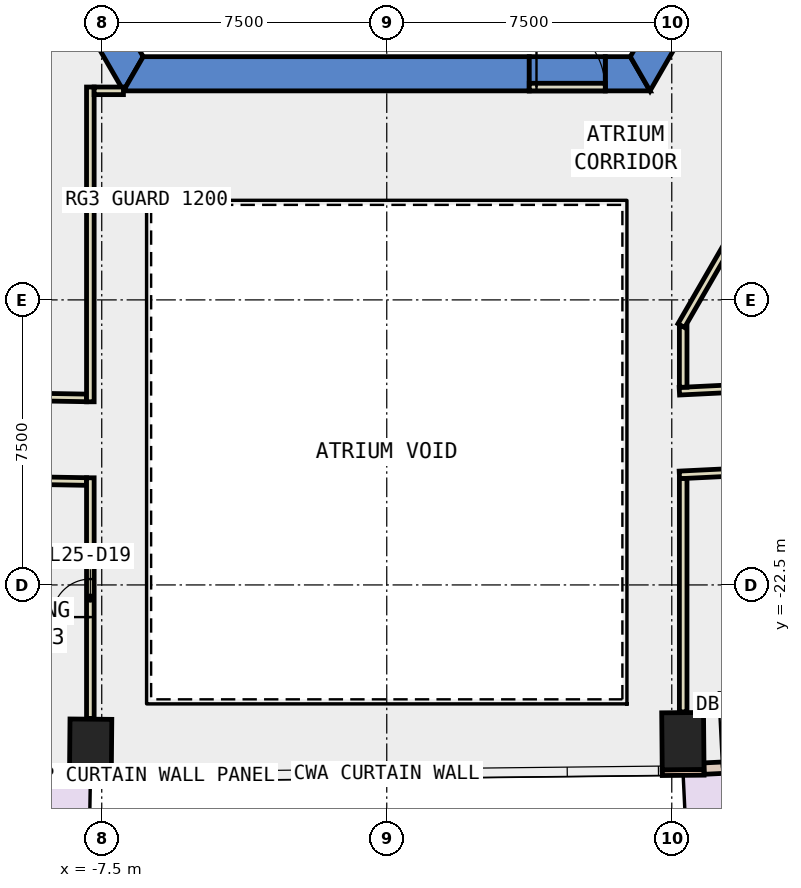
"""IFC4 building model, lengths in metres.
Left out: names, types, materials, properties, quantities, classifications, styles, units other than length and angle.
Written with IfcOpenShell. Run it as: python <this file> out.ifc"""

import sys

from ifc_helpers import new_model, si_unit, direction, frame, frame_2d, origin, origin_2d, place, context, subcontext, project, spatial, polyline, rectangle, outline, extrude, element, fill, save


model = new_model("IFC4")
c1 = context("Model", 3, precision=1e-05, world=origin(), true_north=direction((0.0, 1.0)))
c2 = subcontext(c1, "Body", "Model", "MODEL_VIEW")
j1 = project(units=[si_unit("LENGTHUNIT", "METRE"), si_unit("PLANEANGLEUNIT", "RADIAN")], contexts=[c1])
p1 = place(None, origin())
s1 = spatial("IfcSite", under=j1, at=p1, CompositionType="ELEMENT")
p2 = place(p1, origin())
s2 = spatial("IfcBuilding", under=s1, at=p2, CompositionType="ELEMENT")
p3 = place(p2, frame((0.0, 0.0, 116.0)))
s3 = spatial("IfcBuildingStorey", under=s2, at=p3, CompositionType="ELEMENT", Elevation=116.0)
for number, where, z_axis, x_axis in (
    (1, (-7.792, -26.782, -0.4), (0.0, 0.0, 1.0), (-1.0, 0.009, 0.0)),
    (2, (7.792, -26.61, -0.4), (0.0, 0.0, 1.0), (1.0, 0.009, 0.0)),
):
    element("IfcColumn", number, at=place(p3, frame(where, z_axis=z_axis, x_axis=x_axis)), inside=s3, PredefinedType="COLUMN", context=c2, shape_type="SweptSolid", body=[
        extrude(rectangle(XDim=1.1, YDim=1.5, at=origin_2d()), origin(), (0.0, 0.0, 1.0), 4.2),
    ])
p4 = place(p3, frame((0.0, 0.0, -0.4)))
e3 = element("IfcWall", 3, at=p4, inside=s3, PredefinedType="SHEAR", context=c2, shape_type="SweptSolid", body=[
    extrude(outline(polyline([(-13.856, 2.5), (-6.928, -9.5), (-6.409, -8.6), (-12.817, 2.5), (-13.856, 2.5)])), origin(), (0.0, 0.0, 1.0), 4.2),
])
p5 = place(p3, frame((0.0, 0.0, -0.4)))
e4 = element("IfcWall", 4, at=p5, inside=s3, PredefinedType="SHEAR", context=c2, shape_type="SweptSolid", body=[
    extrude(outline(polyline([(3.75, -9.5), (3.75, -8.6), (-6.409, -8.6), (-6.928, -9.5), (3.75, -9.5)])), origin(), (0.0, 0.0, 1.0), 4.2),
])
p6 = place(p3, frame((0.0, 0.0, -0.4)))
e5 = element("IfcWall", 5, at=p6, inside=s3, PredefinedType="SHEAR", context=c2, shape_type="SweptSolid", body=[
    extrude(outline(polyline([(5.75, -8.6), (5.75, -9.5), (6.928, -9.5), (6.409, -8.6), (5.75, -8.6)])), origin(), (0.0, 0.0, 1.0), 4.2),
])
p7 = place(p3, frame((0.0, 0.0, 3.6)))
e6 = element("IfcWall", 6, at=p7, inside=s3, PredefinedType="SHEAR", context=c2, shape_type="SweptSolid", body=[
    extrude(outline(polyline([(5.75, -9.5), (5.75, -8.6), (3.75, -8.6), (3.75, -9.5), (5.75, -9.5)])), origin(), (0.0, 0.0, 1.0), 0.2),
])
p8 = place(p3, frame((0.0, 0.0, -0.4)))
e7 = element("IfcWall", 7, at=p8, inside=s3, PredefinedType="SHEAR", context=c2, shape_type="SweptSolid", body=[
    extrude(outline(polyline([(8.117, -7.44), (7.338, -6.99), (6.409, -8.6), (6.928, -9.5), (8.117, -7.44)])), origin(), (0.0, 0.0, 1.0), 4.2),
])
for number, where, z_axis, x_axis in (
    (8, (-8.349, -27.602, 0.0), (0.0, 0.0, 1.0), (1.0, -0.009, 0.0)),
    (9, (7.249, -27.44, 0.0), (0.0, 0.0, 1.0), (1.0, 0.009, 0.0)),
):
    element("IfcWall", number, at=place(p3, frame(where, z_axis=z_axis, x_axis=x_axis)), inside=s3, PredefinedType="STANDARD", context=c2, shape_type="SweptSolid", body=[
        extrude(rectangle(XDim=1.1, YDim=0.15, at=frame_2d((0.55, 0.0))), origin(), (0.0, 0.0, 1.0), 3.8),
    ])
p9 = place(p3, frame((-14.242, -27.421, 0.0), z_axis=(0.0, 0.0, 1.0), x_axis=(0.999850142513, -0.017311629508, 0.0)))
e10 = element("IfcWall", 10, at=p9, inside=s3, PredefinedType="STANDARD", context=c2, shape_type="SweptSolid", body=[
    extrude(rectangle(XDim=5.895, YDim=0.3, at=frame_2d((2.948, 0.0))), origin(), (0.0, 0.0, 1.0), 3.8),
])
p10 = place(p9, frame((0.474, 0.0, 0.0)))
e11 = element("IfcOpeningElement", 11, at=p10, cuts=e10, PredefinedType="OPENING", context=c2, shape_type="SweptSolid", body=[
    extrude(rectangle(XDim=2.0, YDim=2.4, at=frame_2d((1.0, 1.2))), frame((0.0, 0.16, 0.0), z_axis=(0.0, -1.0, 0.0), x_axis=(1.0, 0.0, 0.0)), (0.0, 0.0, 1.0), 0.32),
])
p11 = place(p9, frame((3.421, 0.0, 0.9)))
e12 = element("IfcOpeningElement", 12, at=p11, cuts=e10, PredefinedType="OPENING", context=c2, shape_type="SweptSolid", body=[
    extrude(rectangle(XDim=2.0, YDim=2.6, at=frame_2d((1.0, 1.3))), frame((0.0, 0.16, 0.0), z_axis=(0.0, -1.0, 0.0), x_axis=(1.0, 0.0, 0.0)), (0.0, 0.0, 1.0), 0.32),
])
p12 = place(p3, frame((8.347, -27.333, 0.0), z_axis=(0.0, 0.0, 1.0), x_axis=(0.998800343021, 0.048968099633, 0.0)))
e13 = element("IfcWall", 13, at=p12, inside=s3, PredefinedType="STANDARD", context=c2, shape_type="SweptSolid", body=[
    extrude(rectangle(XDim=5.903, YDim=0.3, at=frame_2d((2.952, 0.0))), origin(), (0.0, 0.0, 1.0), 3.8),
])
p13 = place(p12, frame((0.476, 0.0, 0.0)))
e14 = element("IfcOpeningElement", 14, at=p13, cuts=e13, PredefinedType="OPENING", context=c2, shape_type="SweptSolid", body=[
    extrude(rectangle(XDim=2.0, YDim=2.4, at=frame_2d((1.0, 1.2))), frame((0.0, 0.16, 0.0), z_axis=(0.0, -1.0, 0.0), x_axis=(1.0, 0.0, 0.0)), (0.0, 0.0, 1.0), 0.32),
])
p14 = place(p12, frame((3.427, 0.0, 0.9)))
e15 = element("IfcOpeningElement", 15, at=p14, cuts=e13, PredefinedType="OPENING", context=c2, shape_type="SweptSolid", body=[
    extrude(rectangle(XDim=2.0, YDim=2.6, at=frame_2d((1.0, 1.3))), frame((0.0, 0.16, 0.0), z_axis=(0.0, -1.0, 0.0), x_axis=(1.0, 0.0, 0.0)), (0.0, 0.0, 1.0), 0.32),
])
p15 = place(p3, frame((8.468, -28.879, 0.0), z_axis=(0.0, 0.0, 1.0), x_axis=(0.998802192145, 0.048930368554, 0.0)))
e16 = element("IfcWall", 16, at=p15, inside=s3, PredefinedType="STANDARD", context=c2, shape_type="SweptSolid", body=[
    extrude(rectangle(XDim=5.803, YDim=0.8, at=frame_2d((2.901, 0.0))), origin(), (0.0, 0.0, 1.0), 0.8),
])
p16 = place(p3, frame((7.7, -17.403, 0.0), z_axis=(0.0, 0.0, 1.0), x_axis=(0.998792748077, 0.049122768543, 0.0)))
e17 = element("IfcWall", 17, at=p16, inside=s3, PredefinedType="PARTITIONING", context=c2, shape_type="SweptSolid", body=[
    extrude(rectangle(XDim=6.62, YDim=0.2, at=frame_2d((3.31, 0.0))), origin(), (0.0, 0.0, 1.0), 3.8),
])
p17 = place(p3, frame((-14.569, -17.464, 0.0), z_axis=(0.0, 0.0, 1.0), x_axis=(0.999851389672, -0.017239448129, 0.0)))
e18 = element("IfcWall", 18, at=p17, inside=s3, PredefinedType="PARTITIONING", context=c2, shape_type="SweptSolid", body=[
    extrude(rectangle(XDim=6.67, YDim=0.2, at=frame_2d((3.335, 0.0))), origin(), (0.0, 0.0, 1.0), 3.8),
])
p18 = place(p3, frame((14.418, -19.276, 0.0), z_axis=(0.0, 0.0, 1.0), x_axis=(-0.998802248261, -0.04892922305, 0.0)))
e19 = element("IfcWall", 19, at=p18, inside=s3, PredefinedType="PARTITIONING", context=c2, shape_type="SweptSolid", body=[
    extrude(rectangle(XDim=6.726, YDim=0.2, at=frame_2d((3.363, 0.0))), origin(), (0.0, 0.0, 1.0), 3.8),
])
p19 = place(p3, frame((-7.9, -19.779, 0.0), z_axis=(0.0, 0.0, 1.0), x_axis=(-0.999851582532, 0.017228259004, 0.0)))
e20 = element("IfcWall", 20, at=p19, inside=s3, PredefinedType="PARTITIONING", context=c2, shape_type="SweptSolid", body=[
    extrude(rectangle(XDim=3.188, YDim=0.2, at=frame_2d((1.594, 0.0))), origin(), (0.0, 0.0, 1.0), 3.8),
])
p20 = place(p3, frame((7.8, -15.69, 0.0), z_axis=(0.0, 0.0, 1.0), x_axis=(0.0, -1.0, 0.0)))
e21 = element("IfcWall", 21, at=p20, inside=s3, PredefinedType="PARTITIONING", context=c2, shape_type="SweptSolid", body=[
    extrude(rectangle(XDim=1.608, YDim=0.2, at=frame_2d((0.804, 0.0))), origin(), (0.0, 0.0, 1.0), 3.8),
])
p21 = place(p3, frame((-7.8, -17.681, 0.0), z_axis=(0.0, 0.0, 1.0), x_axis=(0.0, 1.0, 0.0)))
e22 = element("IfcWall", 22, at=p21, inside=s3, PredefinedType="PARTITIONING", context=c2, shape_type="SweptSolid", body=[
    extrude(rectangle(XDim=8.282, YDim=0.2, at=frame_2d((4.141, 0.0))), origin(), (0.0, 0.0, 1.0), 3.8),
])
p22 = place(p3, frame((-7.7, -9.499, 0.0), z_axis=(0.0, 0.0, 1.0), x_axis=(1.0, 0.0, 0.0)))
e23 = element("IfcWall", 23, at=p22, inside=s3, PredefinedType="PARTITIONING", context=c2, shape_type="SweptSolid", body=[
    extrude(rectangle(XDim=0.771, YDim=0.2, at=frame_2d((0.385, 0.0))), origin(), (0.0, 0.0, 1.0), 3.8),
])
p23 = place(p3, frame((7.8, -19.701, 0.0), z_axis=(0.0, 0.0, 1.0), x_axis=(0.0, -1.0, 0.0)))
e24 = element("IfcWall", 24, at=p23, inside=s3, PredefinedType="PARTITIONING", context=c2, shape_type="SweptSolid", body=[
    extrude(rectangle(XDim=6.139, YDim=0.2, at=frame_2d((3.07, 0.0))), origin(), (0.0, 0.0, 1.0), 3.8),
])
p24 = place(p3, frame((-7.8, -26.012, 0.0), z_axis=(0.0, 0.0, 1.0), x_axis=(0.0, 1.0, 0.0)))
e25 = element("IfcWall", 25, at=p24, inside=s3, PredefinedType="PARTITIONING", context=c2, shape_type="SweptSolid", body=[
    extrude(rectangle(XDim=6.331, YDim=0.2, at=frame_2d((3.166, 0.0))), origin(), (0.0, 0.0, 1.0), 3.8),
])
p25 = place(p24, frame((2.666, 0.0, 0.0)))
e26 = element("IfcOpeningElement", 26, at=p25, cuts=e25, PredefinedType="OPENING", context=c2, shape_type="SweptSolid", body=[
    extrude(rectangle(XDim=1.0, YDim=2.1, at=frame_2d((0.5, 1.05))), frame((0.0, 0.11, 0.0), z_axis=(0.0, -1.0, 0.0), x_axis=(1.0, 0.0, 0.0)), (0.0, 0.0, 1.0), 0.22),
])
p26 = place(p3, frame((3.75, -9.4, 0.0), z_axis=(0.0, 0.0, 1.0), x_axis=(1.0, 0.0, 0.0)))
e27 = element("IfcWall", 27, at=p26, inside=s3, PredefinedType="PARTITIONING", context=c2, shape_type="SweptSolid", body=[
    extrude(rectangle(XDim=2.0, YDim=0.2, at=frame_2d((1.0, 0.0))), origin(), (0.0, 0.0, 1.0), 2.4),
])
p27 = place(p26, frame((0.19, 0.0, 0.0)))
e28 = element("IfcOpeningElement", 28, at=p27, cuts=e27, PredefinedType="OPENING", context=c2, shape_type="SweptSolid", body=[
    extrude(rectangle(XDim=1.8, YDim=2.1, at=frame_2d((0.9, 1.05))), frame((0.0, 0.11, 0.0), z_axis=(0.0, -1.0, 0.0), x_axis=(1.0, 0.0, 0.0)), (0.0, 0.0, 1.0), 0.22),
])
p28 = place(p3, frame((12.401, -7.621, 0.0), z_axis=(0.0, 0.0, 1.0), x_axis=(-0.499983724212, -0.866034800411, 0.0)))
e29 = element("IfcWall", 29, at=p28, inside=s3, PredefinedType="PARTITIONING", context=c2, shape_type="SweptSolid", body=[
    extrude(rectangle(XDim=9.302, YDim=0.2, at=frame_2d((4.651, 0.0))), origin(), (0.0, 0.0, 1.0), 3.8),
])
p29 = place(p25, origin())
e30 = element("IfcDoor", 30, at=p29, inside=s3, OperationType="SINGLE_SWING_LEFT", PredefinedType="DOOR", context=c2, shape_type="SweptSolid", body=[
    extrude(rectangle(XDim=1.0, YDim=2.1, at=frame_2d((0.5, 1.05))), frame((0.0, 0.025, 0.0), z_axis=(0.0, -1.0, 0.0), x_axis=(1.0, 0.0, 0.0)), (0.0, 0.0, 1.0), 0.05),
])
fill(e26, e30)
p30 = place(p27, origin())
e31 = element("IfcDoor", 31, at=p30, inside=s3, OperationType="DOUBLE_DOOR_SINGLE_SWING", PredefinedType="DOOR", context=c2, shape_type="SweptSolid", body=[
    extrude(rectangle(XDim=1.8, YDim=2.1, at=frame_2d((0.9, 1.05))), frame((0.0, 0.025, 0.0), z_axis=(0.0, -1.0, 0.0), x_axis=(1.0, 0.0, 0.0)), (0.0, 0.0, 1.0), 0.05),
])
fill(e28, e31)
save(model, sys.argv[1])
